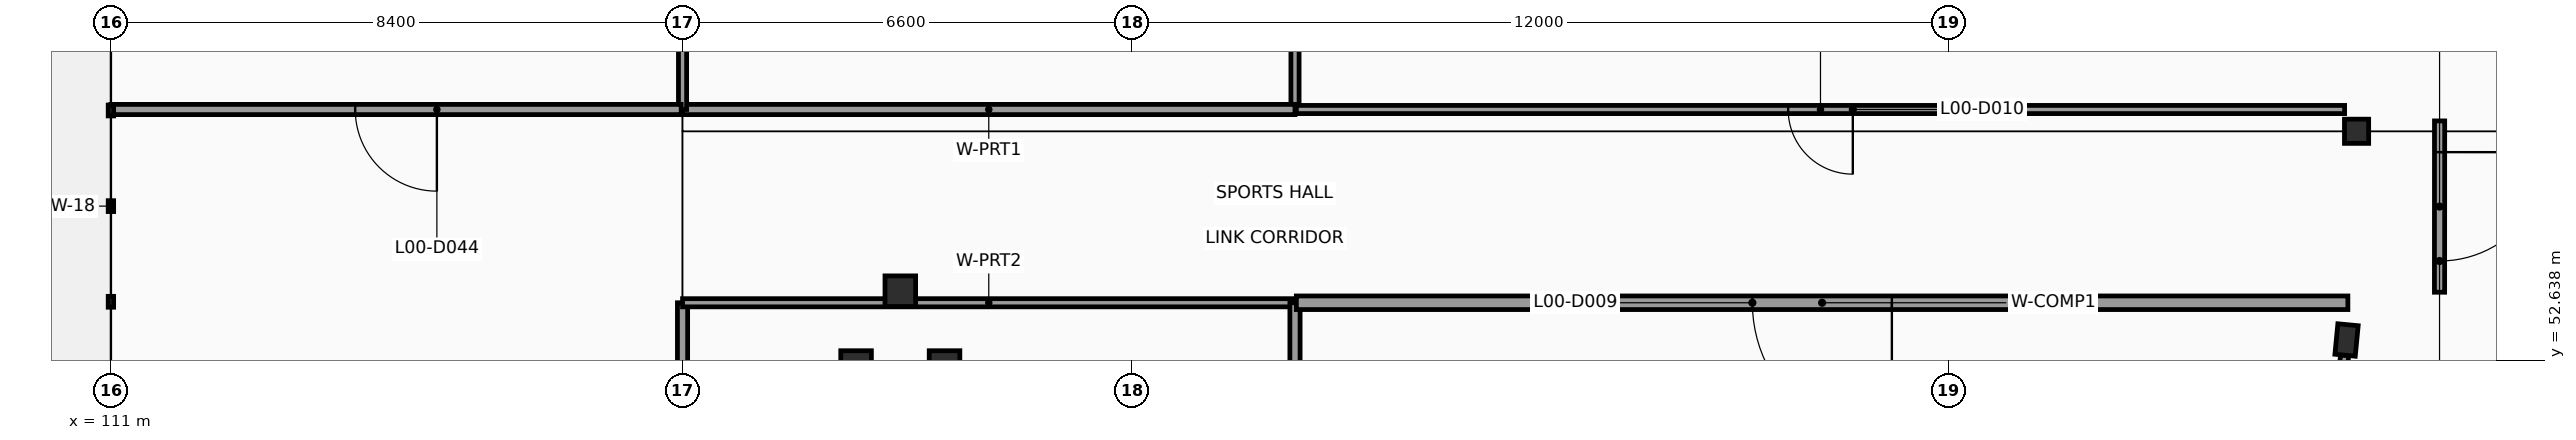
"""IFC4 building model, lengths in metres.
Left out: names, types, materials, properties, quantities, classifications, styles, units other than length and angle.
Written with IfcOpenShell. Run it as: python <this file> out.ifc"""

import sys

from ifc_helpers import new_model, si_unit, direction, frame, frame_2d, origin, origin_2d, place, context, subcontext, project, spatial, rectangle, hollow_circle, i_section, extrude, element, fill, save


model = new_model("IFC4")
c1 = context("Model", 3, precision=1e-05, world=origin(), true_north=direction((0.0, 1.0)))
c2 = subcontext(c1, "Body", "Model", "MODEL_VIEW")
j1 = project(units=[si_unit("LENGTHUNIT", "METRE"), si_unit("PLANEANGLEUNIT", "RADIAN")], contexts=[c1])
p1 = place(None, origin())
s1 = spatial("IfcSite", under=j1, at=p1, CompositionType="ELEMENT")
p2 = place(p1, origin())
s2 = spatial("IfcBuilding", under=s1, at=p2, CompositionType="ELEMENT")
p3 = place(p2, origin())
s3 = spatial("IfcBuildingStorey", under=s2, at=p3, CompositionType="ELEMENT", Elevation=0.0)
p4 = place(p3, frame((143.853, 52.933, -0.4), z_axis=(0.0, 0.0, 1.0), x_axis=(0.995396198367, -0.09584575252, 0.0)))
e1 = element("IfcColumn", 1, at=p4, inside=s3, PredefinedType="COLUMN", context=c2, shape_type="SweptSolid", body=[
    extrude(i_section(OverallWidth=0.3, OverallDepth=0.45, WebThickness=0.014, FlangeThickness=0.026, FilletRadius=0.027, at=origin_2d()), origin(), (0.0, 0.0, 1.0), 4.6),
])
p5 = place(p3, frame((144.0, 56.0, -0.4), z_axis=(0.0, 0.0, 1.0), x_axis=(1.0, 0.0, 0.0)))
e2 = element("IfcColumn", 2, at=p5, inside=s3, PredefinedType="COLUMN", context=c2, shape_type="SweptSolid", body=[
    extrude(hollow_circle(Radius=0.178, WallThickness=0.016, at=origin_2d()), origin(), (0.0, 0.0, 1.0), 4.6),
])
for number, where, z_axis, x_axis in (
    (3, (121.95, 52.55, -0.4), (0.0, 0.0, 1.0), (1.0, 0.0, 0.0)),
    (4, (123.25, 52.55, -0.4), (0.0, 0.0, 1.0), (1.0, 0.0, 0.0)),
    (5, (122.6, 53.65, -0.4), (0.0, 0.0, 1.0), (1.0, 0.0, 0.0)),
):
    element("IfcColumn", number, at=place(p3, frame(where, z_axis=z_axis, x_axis=x_axis)), inside=s3, PredefinedType="COLUMN", context=c2, shape_type="SweptSolid", body=[
        extrude(rectangle(XDim=0.45, YDim=0.45, at=origin_2d()), origin(), (0.0, 0.0, 1.0), 4.6),
    ])
p6 = place(p3, frame((143.668, 51.405, 0.0), z_axis=(0.0, 0.0, 1.0), x_axis=(0.119775911082, 0.992800952419, 0.0)))
e6 = element("IfcWall", 6, at=p6, inside=s3, PredefinedType="PARTITIONING", context=c2, shape_type="SweptSolid", body=[
    extrude(rectangle(XDim=1.313, YDim=0.12, at=frame_2d((0.656, 0.0))), origin(), (0.0, 0.0, 1.0), 3.54),
])
p7 = place(p3, frame((145.219, 53.635, 0.0), z_axis=(0.0, 0.0, 1.0), x_axis=(0.000387935186, 0.999999924753, 0.0)))
e7 = element("IfcWall", 7, at=p7, inside=s3, PredefinedType="PARTITIONING", context=c2, shape_type="SweptSolid", body=[
    extrude(rectangle(XDim=2.517, YDim=0.15, at=frame_2d((1.259, 0.0))), origin(), (0.0, 0.0, 1.0), 3.92),
])
p8 = place(p7, frame((0.459, 0.0, 0.0)))
e8 = element("IfcOpeningElement", 8, at=p8, cuts=e7, PredefinedType="OPENING", context=c2, shape_type="SweptSolid", body=[
    extrude(rectangle(XDim=1.6, YDim=2.2, at=frame_2d((0.8, 1.1))), frame((0.0, 0.085, 0.0), z_axis=(0.0, -1.0, 0.0), x_axis=(1.0, 0.0, 0.0)), (0.0, 0.0, 1.0), 0.17),
])
p9 = place(p3, frame((119.4, 41.673, 0.0), z_axis=(0.0, 0.0, 1.0), x_axis=(0.0, 1.0, 0.0)))
e9 = element("IfcWall", 9, at=p9, inside=s3, PredefinedType="PARTITIONING", context=c2, shape_type="SweptSolid", body=[
    extrude(rectangle(XDim=11.807, YDim=0.15, at=frame_2d((5.903, 0.0))), origin(), (0.0, 0.0, 1.0), 3.28),
])
p10 = place(p9, frame((5.003, 0.0, 0.0)))
e10 = element("IfcOpeningElement", 10, at=p10, cuts=e9, PredefinedType="OPENING", context=c2, shape_type="SweptSolid", body=[
    extrude(rectangle(XDim=1.8, YDim=2.25, at=frame_2d((0.9, 1.125))), frame((0.0, 0.085, 0.0), z_axis=(0.0, -1.0, 0.0), x_axis=(1.0, 0.0, 0.0)), (0.0, 0.0, 1.0), 0.17),
])
p11 = place(p3, frame((119.4, 53.48, 0.0), z_axis=(0.0, 0.0, 1.0), x_axis=(1.0, 0.0, 0.0)))
e11 = element("IfcWall", 11, at=p11, inside=s3, PredefinedType="PARTITIONING", context=c2, shape_type="SweptSolid", body=[
    extrude(rectangle(XDim=9.0, YDim=0.12, at=frame_2d((4.5, 0.0))), origin(), (0.0, 0.0, 1.0), 3.32),
])
p12 = place(p3, frame((128.4, 53.48, 0.0), z_axis=(0.0, 0.0, 1.0), x_axis=(0.0, -1.0, 0.0)))
e12 = element("IfcWall", 12, at=p12, inside=s3, PredefinedType="PARTITIONING", context=c2, shape_type="SweptSolid", body=[
    extrude(rectangle(XDim=11.796, YDim=0.15, at=frame_2d((5.898, 0.0))), origin(), (0.0, 0.0, 1.0), 3.92),
])
p13 = place(p3, frame((128.4, 68.152, 0.0), z_axis=(0.0, 0.0, 1.0), x_axis=(0.0, -1.0, 0.0)))
e13 = element("IfcWall", 13, at=p13, inside=s3, PredefinedType="PARTITIONING", context=c2, shape_type="SweptSolid", body=[
    extrude(rectangle(XDim=11.832, YDim=0.12, at=frame_2d((5.916, 0.0))), origin(), (0.0, 0.0, 1.0), 3.92),
])
p14 = place(p13, frame((5.466, 0.0, 0.0)))
e14 = element("IfcOpeningElement", 14, at=p14, cuts=e13, PredefinedType="OPENING", context=c2, shape_type="SweptSolid", body=[
    extrude(rectangle(XDim=0.9, YDim=2.1, at=frame_2d((0.45, 1.05))), frame((0.0, 0.07, 0.0), z_axis=(0.0, -1.0, 0.0), x_axis=(1.0, 0.0, 0.0)), (0.0, 0.0, 1.0), 0.14),
])
p15 = place(p3, frame((128.4, 56.32, 0.0), z_axis=(0.0, 0.0, 1.0), x_axis=(-1.0, 0.0, 0.0)))
e15 = element("IfcWall", 15, at=p15, inside=s3, PredefinedType="PARTITIONING", context=c2, shape_type="SweptSolid", body=[
    extrude(rectangle(XDim=9.0, YDim=0.15, at=frame_2d((4.5, 0.0))), origin(), (0.0, 0.0, 1.0), 3.32),
])
p16 = place(p3, frame((119.4, 56.32, 0.0), z_axis=(0.0, 0.0, 1.0), x_axis=(0.0, 1.0, 0.0)))
e16 = element("IfcWall", 16, at=p16, inside=s3, PredefinedType="PARTITIONING", context=c2, shape_type="SweptSolid", body=[
    extrude(rectangle(XDim=11.807, YDim=0.12, at=frame_2d((5.903, 0.0))), origin(), (0.0, 0.0, 1.0), 3.32),
])
p17 = place(p3, frame((128.42, 53.48, 0.0), z_axis=(0.0, 0.0, 1.0), x_axis=(1.0, 0.0, 0.0)))
e17 = element("IfcWall", 17, at=p17, inside=s3, PredefinedType="PARTITIONING", context=c2, shape_type="SweptSolid", body=[
    extrude(rectangle(XDim=15.452, YDim=0.2, at=frame_2d((7.726, 0.0))), origin(), (0.0, 0.0, 1.0), 3.54),
])
p18 = place(p17, frame((6.701, 0.0, 0.0)))
e18 = element("IfcOpeningElement", 18, at=p18, cuts=e17, PredefinedType="OPENING", context=c2, shape_type="SweptSolid", body=[
    extrude(rectangle(XDim=2.05, YDim=2.35, at=frame_2d((1.025, 1.175))), frame((0.0, 0.11, 0.0), z_axis=(0.0, -1.0, 0.0), x_axis=(1.0, 0.0, 0.0)), (0.0, 0.0, 1.0), 0.22),
])
p19 = place(p3, frame((143.824, 56.32, 0.0), z_axis=(0.0, 0.0, 1.0), x_axis=(-1.0, 0.0, 0.0)))
e19 = element("IfcWall", 19, at=p19, inside=s3, PredefinedType="PARTITIONING", context=c2, shape_type="SweptSolid", body=[
    extrude(rectangle(XDim=15.404, YDim=0.12, at=frame_2d((7.702, 0.0))), origin(), (0.0, 0.0, 1.0), 3.54),
])
p20 = place(p19, frame((7.227, 0.0, 0.0)))
e20 = element("IfcOpeningElement", 20, at=p20, cuts=e19, PredefinedType="OPENING", context=c2, shape_type="SweptSolid", body=[
    extrude(rectangle(XDim=0.95, YDim=2.1, at=frame_2d((0.475, 1.05))), frame((0.0, 0.07, 0.0), z_axis=(0.0, -1.0, 0.0), x_axis=(1.0, 0.0, 0.0)), (0.0, 0.0, 1.0), 0.14),
])
p21 = place(p3, frame((119.38, 56.32, 0.0), z_axis=(0.0, 0.0, 1.0), x_axis=(-1.0, 0.0, 0.0)))
e21 = element("IfcWall", 21, at=p21, inside=s3, PredefinedType="PARTITIONING", context=c2, shape_type="SweptSolid", body=[
    extrude(rectangle(XDim=8.38, YDim=0.15, at=frame_2d((4.19, 0.0))), origin(), (0.0, 0.0, 1.0), 3.22),
])
p22 = place(p21, frame((3.59, 0.0, 0.0)))
e22 = element("IfcOpeningElement", 22, at=p22, cuts=e21, PredefinedType="OPENING", context=c2, shape_type="SweptSolid", body=[
    extrude(rectangle(XDim=1.2, YDim=2.15, at=frame_2d((0.6, 1.075))), frame((0.0, 0.085, 0.0), z_axis=(0.0, -1.0, 0.0), x_axis=(1.0, 0.0, 0.0)), (0.0, 0.0, 1.0), 0.17),
])
p23 = place(p8, origin())
e23 = element("IfcDoor", 23, at=p23, inside=s3, OperationType="DOUBLE_DOOR_SINGLE_SWING", PredefinedType="DOOR", context=c2, shape_type="SweptSolid", body=[
    extrude(rectangle(XDim=1.6, YDim=2.2, at=frame_2d((0.8, 1.1))), frame((0.0, 0.025, 0.0), z_axis=(0.0, -1.0, 0.0), x_axis=(1.0, 0.0, 0.0)), (0.0, 0.0, 1.0), 0.05),
])
fill(e8, e23)
p24 = place(p18, origin())
e24 = element("IfcDoor", 24, at=p24, inside=s3, OperationType="DOUBLE_DOOR_SINGLE_SWING", PredefinedType="DOOR", context=c2, shape_type="SweptSolid", body=[
    extrude(rectangle(XDim=2.05, YDim=2.35, at=frame_2d((1.025, 1.175))), frame((0.0, 0.025, 0.0), z_axis=(0.0, -1.0, 0.0), x_axis=(1.0, 0.0, 0.0)), (0.0, 0.0, 1.0), 0.05),
])
fill(e18, e24)
p25 = place(p20, origin())
e25 = element("IfcDoor", 25, at=p25, inside=s3, OperationType="SINGLE_SWING_LEFT", PredefinedType="DOOR", context=c2, shape_type="SweptSolid", body=[
    extrude(rectangle(XDim=0.95, YDim=2.1, at=frame_2d((0.475, 1.05))), frame((0.0, 0.025, 0.0), z_axis=(0.0, -1.0, 0.0), x_axis=(1.0, 0.0, 0.0)), (0.0, 0.0, 1.0), 0.05),
])
fill(e20, e25)
p26 = place(p22, origin())
e26 = element("IfcDoor", 26, at=p26, inside=s3, OperationType="SINGLE_SWING_LEFT", PredefinedType="DOOR", context=c2, shape_type="SweptSolid", body=[
    extrude(rectangle(XDim=1.2, YDim=2.15, at=frame_2d((0.6, 1.075))), frame((0.0, 0.025, 0.0), z_axis=(0.0, -1.0, 0.0), x_axis=(1.0, 0.0, 0.0)), (0.0, 0.0, 1.0), 0.05),
])
fill(e22, e26)
save(model, sys.argv[1])
